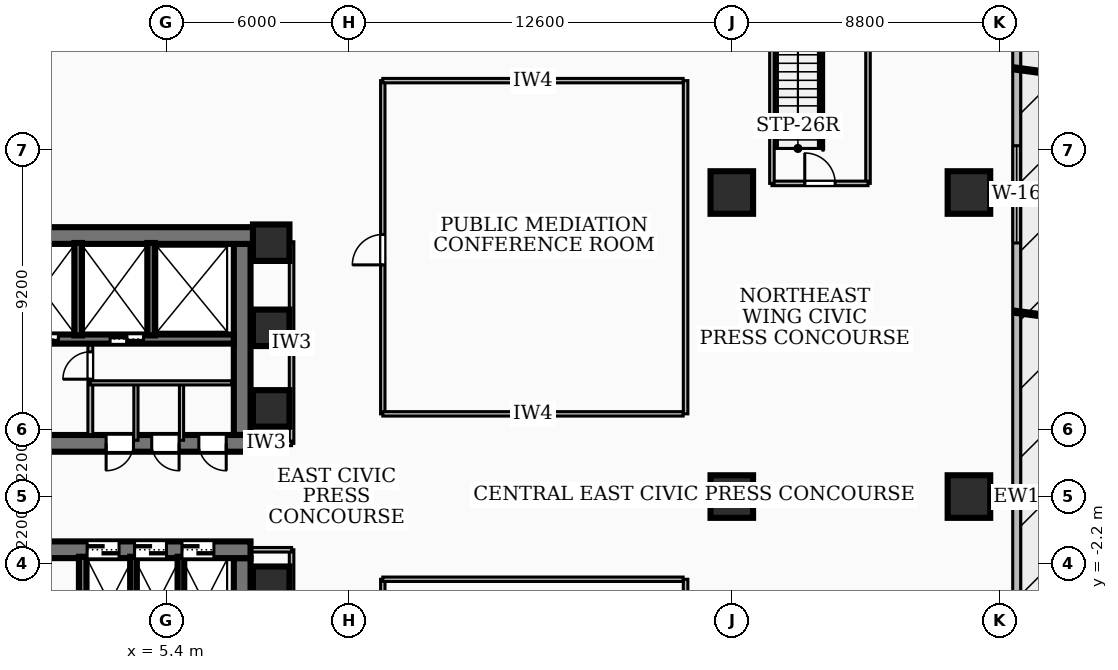
"""IFC4 building model, lengths in metres.
Left out: names, types, materials, properties, quantities, classifications, styles, units other than length and angle.
Written with IfcOpenShell. Run it as: python <this file> out.ifc"""

import sys

from ifc_helpers import new_model, si_unit, direction, frame, frame_2d, origin, origin_2d, place, context, subcontext, project, spatial, rectangle, extrude, element, fill, save


model = new_model("IFC4")
c1 = context("Model", 3, precision=1e-05, world=origin(), true_north=direction((0.0, 1.0)))
c2 = subcontext(c1, "Body", "Model", "MODEL_VIEW")
j1 = project(units=[si_unit("LENGTHUNIT", "METRE"), si_unit("PLANEANGLEUNIT", "RADIAN")], contexts=[c1])
p1 = place(None, origin())
s1 = spatial("IfcSite", under=j1, at=p1, CompositionType="ELEMENT")
p2 = place(p1, origin())
s2 = spatial("IfcBuilding", under=s1, at=p2, CompositionType="ELEMENT")
p3 = place(p2, frame((0.0, 0.0, 14.76)))
s3 = spatial("IfcBuildingStorey", under=s2, at=p3, CompositionType="ELEMENT", Elevation=14.76)
p4 = place(p3, frame((-8.78, 8.585, 0.0), z_axis=(0.0, 0.0, 1.0), x_axis=(1.0, 0.0, 0.0)))
e1 = element("IfcWall", 1, at=p4, inside=s3, PredefinedType="SHEAR", context=c2, shape_type="SweptSolid", body=[
    extrude(rectangle(XDim=17.56, YDim=0.55, at=frame_2d((8.78, 0.0))), origin(), (0.0, 0.0, 1.0), 4.28),
])
p5 = place(p3, frame((8.17, 1.75, 0.0), z_axis=(0.0, 0.0, 1.0), x_axis=(-1.0, 0.0, 0.0)))
e2 = element("IfcWall", 2, at=p5, inside=s3, PredefinedType="SHEAR", context=c2, shape_type="SweptSolid", body=[
    extrude(rectangle(XDim=16.34, YDim=0.55, at=frame_2d((8.17, 0.0))), origin(), (0.0, 0.0, 1.0), 4.28),
])
p6 = place(p5, frame((7.45, 0.0, 0.0)))
e3 = element("IfcOpeningElement", 3, at=p6, cuts=e2, PredefinedType="OPENING", context=c2, shape_type="SweptSolid", body=[
    extrude(rectangle(XDim=1.0, YDim=2.1, at=frame_2d((0.5, 1.05))), frame((0.0, 0.285, 0.0), z_axis=(0.0, -1.0, 0.0), x_axis=(1.0, 0.0, 0.0)), (0.0, 0.0, 1.0), 0.57),
])
p7 = place(p5, frame((3.85, 0.0, 0.0)))
e4 = element("IfcOpeningElement", 4, at=p7, cuts=e2, PredefinedType="OPENING", context=c2, shape_type="SweptSolid", body=[
    extrude(rectangle(XDim=0.9, YDim=2.06, at=frame_2d((0.45, 1.03))), frame((0.0, 0.285, 0.0), z_axis=(0.0, -1.0, 0.0), x_axis=(1.0, 0.0, 0.0)), (0.0, 0.0, 1.0), 0.57),
])
p8 = place(p5, frame((2.35, 0.0, 0.0)))
e5 = element("IfcOpeningElement", 5, at=p8, cuts=e2, PredefinedType="OPENING", context=c2, shape_type="SweptSolid", body=[
    extrude(rectangle(XDim=0.9, YDim=2.06, at=frame_2d((0.45, 1.03))), frame((0.0, 0.285, 0.0), z_axis=(0.0, -1.0, 0.0), x_axis=(1.0, 0.0, 0.0)), (0.0, 0.0, 1.0), 0.57),
])
p9 = place(p5, frame((0.8, 0.0, 0.0)))
e6 = element("IfcOpeningElement", 6, at=p9, cuts=e2, PredefinedType="OPENING", context=c2, shape_type="SweptSolid", body=[
    extrude(rectangle(XDim=0.9, YDim=2.06, at=frame_2d((0.45, 1.03))), frame((0.0, 0.285, 0.0), z_axis=(0.0, -1.0, 0.0), x_axis=(1.0, 0.0, 0.0)), (0.0, 0.0, 1.0), 0.57),
])
p10 = place(p3, frame((7.895, 8.31, 0.0), z_axis=(0.0, 0.0, 1.0), x_axis=(0.0, -1.0, 0.0)))
e7 = element("IfcWall", 7, at=p10, inside=s3, PredefinedType="SHEAR", context=c2, shape_type="SweptSolid", body=[
    extrude(rectangle(XDim=6.285, YDim=0.55, at=frame_2d((3.143, 0.0))), origin(), (0.0, 0.0, 1.0), 4.28),
])
p11 = place(p3, frame((7.62, 5.18, 0.0), z_axis=(0.0, 0.0, 1.0), x_axis=(-1.0, 0.0, 0.0)))
e8 = element("IfcWall", 8, at=p11, inside=s3, PredefinedType="SOLIDWALL", context=c2, shape_type="SweptSolid", body=[
    extrude(rectangle(XDim=15.24, YDim=0.3, at=frame_2d((7.62, 0.0))), origin(), (0.0, 0.0, 1.0), 4.28),
])
p12 = place(p11, frame((5.77, 0.0, 0.0)))
e9 = element("IfcOpeningElement", 9, at=p12, cuts=e8, PredefinedType="OPENING", context=c2, shape_type="SweptSolid", body=[
    extrude(rectangle(XDim=1.1, YDim=2.15, at=frame_2d((0.55, 1.075))), frame((0.0, 0.16, 0.0), z_axis=(0.0, -1.0, 0.0), x_axis=(1.0, 0.0, 0.0)), (0.0, 0.0, 1.0), 0.32),
])
p13 = place(p11, frame((2.97, 0.0, 0.0)))
e10 = element("IfcOpeningElement", 10, at=p13, cuts=e8, PredefinedType="OPENING", context=c2, shape_type="SweptSolid", body=[
    extrude(rectangle(XDim=1.1, YDim=2.15, at=frame_2d((0.55, 1.075))), frame((0.0, 0.16, 0.0), z_axis=(0.0, -1.0, 0.0), x_axis=(1.0, 0.0, 0.0)), (0.0, 0.0, 1.0), 0.32),
])
p14 = place(p11, frame((7.97, 0.0, 0.0)))
e11 = element("IfcOpeningElement", 11, at=p14, cuts=e8, PredefinedType="OPENING", context=c2, shape_type="SweptSolid", body=[
    extrude(rectangle(XDim=1.0, YDim=2.1, at=frame_2d((0.5, 1.05))), frame((0.0, 0.16, 0.0), z_axis=(0.0, -1.0, 0.0), x_axis=(1.0, 0.0, 0.0)), (0.0, 0.0, 1.0), 0.32),
])
p15 = place(p3, frame((-8.17, -1.75, 0.0), z_axis=(0.0, 0.0, 1.0), x_axis=(1.0, 0.0, 0.0)))
e12 = element("IfcWall", 12, at=p15, inside=s3, PredefinedType="SHEAR", context=c2, shape_type="SweptSolid", body=[
    extrude(rectangle(XDim=16.34, YDim=0.55, at=frame_2d((8.17, 0.0))), origin(), (0.0, 0.0, 1.0), 4.28),
])
p16 = place(p15, frame((7.45, 0.0, 0.0)))
e13 = element("IfcOpeningElement", 13, at=p16, cuts=e12, PredefinedType="OPENING", context=c2, shape_type="SweptSolid", body=[
    extrude(rectangle(XDim=1.0, YDim=2.1, at=frame_2d((0.5, 1.05))), frame((0.0, 0.285, 0.0), z_axis=(0.0, -1.0, 0.0), x_axis=(1.0, 0.0, 0.0)), (0.0, 0.0, 1.0), 0.57),
])
p17 = place(p15, frame((10.965, 0.0, 0.0)))
e14 = element("IfcOpeningElement", 14, at=p17, cuts=e12, PredefinedType="OPENING", context=c2, shape_type="SweptSolid", body=[
    extrude(rectangle(XDim=1.05, YDim=2.15, at=frame_2d((0.525, 1.075))), frame((0.0, 0.285, 0.0), z_axis=(0.0, -1.0, 0.0), x_axis=(1.0, 0.0, 0.0)), (0.0, 0.0, 1.0), 0.57),
])
p18 = place(p15, frame((12.525, 0.0, 0.0)))
e15 = element("IfcOpeningElement", 15, at=p18, cuts=e12, PredefinedType="OPENING", context=c2, shape_type="SweptSolid", body=[
    extrude(rectangle(XDim=1.05, YDim=2.15, at=frame_2d((0.525, 1.075))), frame((0.0, 0.285, 0.0), z_axis=(0.0, -1.0, 0.0), x_axis=(1.0, 0.0, 0.0)), (0.0, 0.0, 1.0), 0.57),
])
p19 = place(p15, frame((14.085, 0.0, 0.0)))
e16 = element("IfcOpeningElement", 16, at=p19, cuts=e12, PredefinedType="OPENING", context=c2, shape_type="SweptSolid", body=[
    extrude(rectangle(XDim=1.05, YDim=2.15, at=frame_2d((0.525, 1.075))), frame((0.0, 0.285, 0.0), z_axis=(0.0, -1.0, 0.0), x_axis=(1.0, 0.0, 0.0)), (0.0, 0.0, 1.0), 0.57),
])
p20 = place(p3, frame((7.895, -2.025, 0.0), z_axis=(0.0, 0.0, 1.0), x_axis=(0.0, -1.0, 0.0)))
e17 = element("IfcWall", 17, at=p20, inside=s3, PredefinedType="SHEAR", context=c2, shape_type="SweptSolid", body=[
    extrude(rectangle(XDim=6.285, YDim=0.55, at=frame_2d((3.143, 0.0))), origin(), (0.0, 0.0, 1.0), 4.28),
])
for number, where, z_axis, x_axis in (
    (18, (2.5, 5.3, 0.0), (0.0, 0.0, 1.0), (0.0, 1.0, 0.0)),
    (19, (4.9, 5.3, 0.0), (0.0, 0.0, 1.0), (0.0, 1.0, 0.0)),
):
    element("IfcWall", number, at=place(p3, frame(where, z_axis=z_axis, x_axis=x_axis)), inside=s3, PredefinedType="SOLIDWALL", context=c2, shape_type="SweptSolid", body=[
        extrude(rectangle(XDim=3.04, YDim=0.25, at=frame_2d((1.52, 0.0))), origin(), (0.0, 0.0, 1.0), 4.28),
    ])
p21 = place(p3, frame((2.65, -5.05, 0.0), z_axis=(0.0, 0.0, 1.0), x_axis=(0.0, 1.0, 0.0)))
e20 = element("IfcWall", 20, at=p21, inside=s3, PredefinedType="SOLIDWALL", context=c2, shape_type="SweptSolid", body=[
    extrude(rectangle(XDim=3.07, YDim=0.25, at=frame_2d((1.535, 0.0))), origin(), (0.0, 0.0, 1.0), 4.28),
])
for number, where, z_axis, x_axis in (
    (21, (4.32, -5.05, 0.0), (0.0, 0.0, 1.0), (0.0, 1.0, 0.0)),
    (22, (5.88, -5.05, 0.0), (0.0, 0.0, 1.0), (0.0, 1.0, 0.0)),
):
    element("IfcWall", number, at=place(p3, frame(where, z_axis=z_axis, x_axis=x_axis)), inside=s3, PredefinedType="SOLIDWALL", context=c2, shape_type="SweptSolid", body=[
        extrude(rectangle(XDim=3.07, YDim=0.22, at=frame_2d((1.535, 0.0))), origin(), (0.0, 0.0, 1.0), 4.28),
    ])
for number, where, z_axis, x_axis in (
    (23, (8.85, -2.9, 0.0), (0.0, 0.0, 1.0), (1.0, 0.0, 0.0)),
    (24, (8.85, 2.9, 0.0), (0.0, 0.0, 1.0), (1.0, 0.0, 0.0)),
    (25, (8.85, 5.55, 0.0), (0.0, 0.0, 1.0), (1.0, 0.0, 0.0)),
    (26, (8.85, 8.35, 0.0), (0.0, 0.0, 1.0), (1.0, 0.0, 0.0)),
):
    element("IfcColumn", number, at=place(p3, frame(where, z_axis=z_axis, x_axis=x_axis)), inside=s3, PredefinedType="COLUMN", context=c2, shape_type="SweptSolid", body=[
        extrude(rectangle(XDim=1.2, YDim=1.2, at=origin_2d()), origin(), (0.0, 0.0, 1.0), 4.68),
    ])
for number, where, z_axis, x_axis in (
    (27, (31.8, 0.0, 0.0), (0.0, 0.0, 1.0), (1.0, 0.0, 0.0)),
    (28, (31.8, 10.0, 0.0), (0.0, 0.0, 1.0), (1.0, 0.0, 0.0)),
    (29, (24.0, 0.0, 0.0), (0.0, 0.0, 1.0), (1.0, 0.0, 0.0)),
    (30, (24.0, 10.0, 0.0), (0.0, 0.0, 1.0), (1.0, 0.0, 0.0)),
):
    element("IfcColumn", number, at=place(p3, frame(where, z_axis=z_axis, x_axis=x_axis)), inside=s3, PredefinedType="COLUMN", context=c2, shape_type="SweptSolid", body=[
        extrude(rectangle(XDim=1.4, YDim=1.4, at=origin_2d()), origin(), (0.0, 0.0, 1.0), 4.68),
    ])
p22 = place(p3, frame((33.37, 27.14, 0.0), z_axis=(0.0, 0.0, 1.0), x_axis=(0.0, -1.0, 0.0)))
e31 = element("IfcWall", 31, at=p22, inside=s3, PredefinedType="SOLIDWALL", context=c2, shape_type="SweptSolid", body=[
    extrude(rectangle(XDim=54.28, YDim=0.26, at=frame_2d((27.14, 0.0))), origin(), (0.0, 0.0, 1.0), 4.28),
])
p23 = place(p22, frame((31.59, 0.0, 0.0)))
e32 = element("IfcOpeningElement", 32, at=p23, cuts=e31, PredefinedType="OPENING", context=c2, shape_type="SweptSolid", body=[
    extrude(rectangle(XDim=1.1, YDim=2.1, at=frame_2d((0.55, 1.05))), frame((0.0, 0.14, 0.0), z_axis=(0.0, -1.0, 0.0), x_axis=(1.0, 0.0, 0.0)), (0.0, 0.0, 1.0), 0.28),
])
p24 = place(p22, frame((6.0, 0.0, 0.9)))
e33 = element("IfcOpeningElement", 33, at=p24, cuts=e31, PredefinedType="OPENING", context=c2, shape_type="SweptSolid", body=[
    extrude(rectangle(XDim=3.2, YDim=2.6, at=frame_2d((1.6, 1.3))), frame((0.0, 0.14, 0.0), z_axis=(0.0, -1.0, 0.0), x_axis=(1.0, 0.0, 0.0)), (0.0, 0.0, 1.0), 0.28),
])
p25 = place(p22, frame((15.6, 0.0, 0.9)))
e34 = element("IfcOpeningElement", 34, at=p25, cuts=e31, PredefinedType="OPENING", context=c2, shape_type="SweptSolid", body=[
    extrude(rectangle(XDim=3.2, YDim=2.6, at=frame_2d((1.6, 1.3))), frame((0.0, 0.14, 0.0), z_axis=(0.0, -1.0, 0.0), x_axis=(1.0, 0.0, 0.0)), (0.0, 0.0, 1.0), 0.28),
])
p26 = place(p22, frame((35.48, 0.0, 0.9)))
e35 = element("IfcOpeningElement", 35, at=p26, cuts=e31, PredefinedType="OPENING", context=c2, shape_type="SweptSolid", body=[
    extrude(rectangle(XDim=3.2, YDim=2.6, at=frame_2d((1.6, 1.3))), frame((0.0, 0.14, 0.0), z_axis=(0.0, -1.0, 0.0), x_axis=(1.0, 0.0, 0.0)), (0.0, 0.0, 1.0), 0.28),
])
p27 = place(p22, frame((45.08, 0.0, 0.9)))
e36 = element("IfcOpeningElement", 36, at=p27, cuts=e31, PredefinedType="OPENING", context=c2, shape_type="SweptSolid", body=[
    extrude(rectangle(XDim=3.2, YDim=2.6, at=frame_2d((1.6, 1.3))), frame((0.0, 0.14, 0.0), z_axis=(0.0, -1.0, 0.0), x_axis=(1.0, 0.0, 0.0)), (0.0, 0.0, 1.0), 0.28),
])
for number, where, z_axis, x_axis in (
    (37, (25.32, 10.3, 0.0), (0.0, 0.0, 1.0), (0.0, 1.0, 0.0)),
    (38, (28.48, 10.3, 0.0), (0.0, 0.0, 1.0), (0.0, 1.0, 0.0)),
):
    element("IfcWall", number, at=place(p3, frame(where, z_axis=z_axis, x_axis=x_axis)), inside=s3, PredefinedType="PARTITIONING", context=c2, shape_type="SweptSolid", body=[
        extrude(rectangle(XDim=9.8, YDim=0.15, at=frame_2d((4.9, 0.0))), origin(), (0.0, 0.0, 1.0), 4.28),
    ])
p28 = place(p3, frame((25.32, 10.3, 0.0), z_axis=(0.0, 0.0, 1.0), x_axis=(1.0, 0.0, 0.0)))
e39 = element("IfcWall", 39, at=p28, inside=s3, PredefinedType="PARTITIONING", context=c2, shape_type="SweptSolid", body=[
    extrude(rectangle(XDim=3.16, YDim=0.15, at=frame_2d((1.58, 0.0))), origin(), (0.0, 0.0, 1.0), 3.29),
])
p29 = place(p28, frame((1.08, 0.0, 0.0)))
e40 = element("IfcOpeningElement", 40, at=p29, cuts=e39, PredefinedType="OPENING", context=c2, shape_type="SweptSolid", body=[
    extrude(rectangle(XDim=1.0, YDim=2.1, at=frame_2d((0.5, 1.05))), frame((0.0, 0.085, 0.0), z_axis=(0.0, -1.0, 0.0), x_axis=(1.0, 0.0, 0.0)), (0.0, 0.0, 1.0), 0.17),
])
p30 = place(p3, frame((2.9, 2.04, 0.0), z_axis=(0.0, 0.0, 1.0), x_axis=(0.0, 1.0, 0.0)))
e41 = element("IfcWall", 41, at=p30, inside=s3, PredefinedType="PARTITIONING", context=c2, shape_type="SweptSolid", body=[
    extrude(rectangle(XDim=2.94, YDim=0.16, at=frame_2d((1.47, 0.0))), origin(), (0.0, 0.0, 1.0), 3.345),
])
p31 = place(p30, frame((1.82, 0.0, 0.0)))
e42 = element("IfcOpeningElement", 42, at=p31, cuts=e41, PredefinedType="OPENING", context=c2, shape_type="SweptSolid", body=[
    extrude(rectangle(XDim=0.9, YDim=2.06, at=frame_2d((0.45, 1.03))), frame((0.0, 0.09, 0.0), z_axis=(0.0, -1.0, 0.0), x_axis=(1.0, 0.0, 0.0)), (0.0, 0.0, 1.0), 0.18),
])
p32 = place(p3, frame((2.9, 3.74, 0.0), z_axis=(0.0, 0.0, 1.0), x_axis=(1.0, 0.0, 0.0)))
e43 = element("IfcWall", 43, at=p32, inside=s3, PredefinedType="PARTITIONING", context=c2, shape_type="SweptSolid", body=[
    extrude(rectangle(XDim=4.65, YDim=0.138, at=frame_2d((2.325, 0.0))), origin(), (0.0, 0.0, 1.0), 4.28),
])
for number, where, z_axis, x_axis in (
    (44, (4.4, 1.85, 0.0), (0.0, 0.0, 1.0), (0.0, 1.0, 0.0)),
    (45, (5.9, 1.85, 0.0), (0.0, 0.0, 1.0), (0.0, 1.0, 0.0)),
):
    element("IfcWall", number, at=place(p3, frame(where, z_axis=z_axis, x_axis=x_axis)), inside=s3, PredefinedType="PARTITIONING", context=c2, shape_type="SweptSolid", body=[
        extrude(rectangle(XDim=1.89, YDim=0.138, at=frame_2d((0.945, 0.0))), origin(), (0.0, 0.0, 1.0), 3.345),
    ])
p33 = place(p3, frame((9.52, 1.75, 0.0), z_axis=(0.0, 0.0, 1.0), x_axis=(0.0, 1.0, 0.0)))
e46 = element("IfcWall", 46, at=p33, inside=s3, PredefinedType="PARTITIONING", context=c2, shape_type="SweptSolid", body=[
    extrude(rectangle(XDim=6.63, YDim=0.15, at=frame_2d((3.315, 0.0))), origin(), (0.0, 0.0, 1.0), 3.29),
])
p34 = place(p3, frame((7.85, 1.75, 0.0), z_axis=(0.0, 0.0, 1.0), x_axis=(1.0, 0.0, 0.0)))
e47 = element("IfcWall", 47, at=p34, inside=s3, PredefinedType="PARTITIONING", context=c2, shape_type="SweptSolid", body=[
    extrude(rectangle(XDim=1.67, YDim=0.15, at=frame_2d((0.835, 0.0))), origin(), (0.0, 0.0, 1.0), 3.345),
])
p35 = place(p3, frame((9.52, -8.38, 0.0), z_axis=(0.0, 0.0, 1.0), x_axis=(0.0, 1.0, 0.0)))
e48 = element("IfcWall", 48, at=p35, inside=s3, PredefinedType="PARTITIONING", context=c2, shape_type="SweptSolid", body=[
    extrude(rectangle(XDim=6.63, YDim=0.15, at=frame_2d((3.315, 0.0))), origin(), (0.0, 0.0, 1.0), 3.29),
])
p36 = place(p3, frame((7.85, -1.75, 0.0), z_axis=(0.0, 0.0, 1.0), x_axis=(1.0, 0.0, 0.0)))
e49 = element("IfcWall", 49, at=p36, inside=s3, PredefinedType="PARTITIONING", context=c2, shape_type="SweptSolid", body=[
    extrude(rectangle(XDim=1.67, YDim=0.15, at=frame_2d((0.835, 0.0))), origin(), (0.0, 0.0, 1.0), 3.345),
])
p37 = place(p3, frame((12.52, 2.72, 0.0), z_axis=(0.0, 0.0, 1.0), x_axis=(0.0, 1.0, 0.0)))
e50 = element("IfcWall", 50, at=p37, inside=s3, PredefinedType="PARTITIONING", context=c2, shape_type="SweptSolid", body=[
    extrude(rectangle(XDim=10.96, YDim=0.145, at=frame_2d((5.48, 0.0))), origin(), (0.0, 0.0, 1.0), 3.29),
])
p38 = place(p37, frame((4.9, 0.0, 0.0)))
e51 = element("IfcOpeningElement", 51, at=p38, cuts=e50, PredefinedType="OPENING", context=c2, shape_type="SweptSolid", body=[
    extrude(rectangle(XDim=1.0, YDim=2.1, at=frame_2d((0.5, 1.05))), frame((0.0, 0.083, 0.0), z_axis=(0.0, -1.0, 0.0), x_axis=(1.0, 0.0, 0.0)), (0.0, 0.0, 1.0), 0.165),
])
for number, where, z_axis, x_axis in (
    (52, (12.52, 2.72, 0.0), (0.0, 0.0, 1.0), (1.0, 0.0, 0.0)),
    (53, (12.52, 13.68, 0.0), (0.0, 0.0, 1.0), (1.0, 0.0, 0.0)),
):
    element("IfcWall", number, at=place(p3, frame(where, z_axis=z_axis, x_axis=x_axis)), inside=s3, PredefinedType="PARTITIONING", context=c2, shape_type="SweptSolid", body=[
        extrude(rectangle(XDim=9.88, YDim=0.145, at=frame_2d((4.94, 0.0))), origin(), (0.0, 0.0, 1.0), 4.28),
    ])
p39 = place(p3, frame((22.48, 2.72, 0.0), z_axis=(0.0, 0.0, 1.0), x_axis=(0.0, 1.0, 0.0)))
e54 = element("IfcWall", 54, at=p39, inside=s3, PredefinedType="PARTITIONING", context=c2, shape_type="SweptSolid", body=[
    extrude(rectangle(XDim=10.96, YDim=0.15, at=frame_2d((5.48, 0.0))), origin(), (0.0, 0.0, 1.0), 3.29),
])
p40 = place(p3, frame((12.52, -13.68, 0.0), z_axis=(0.0, 0.0, 1.0), x_axis=(0.0, 1.0, 0.0)))
e55 = element("IfcWall", 55, at=p40, inside=s3, PredefinedType="PARTITIONING", context=c2, shape_type="SweptSolid", body=[
    extrude(rectangle(XDim=10.96, YDim=0.145, at=frame_2d((5.48, 0.0))), origin(), (0.0, 0.0, 1.0), 3.29),
])
p41 = place(p40, frame((4.9, 0.0, 0.0)))
e56 = element("IfcOpeningElement", 56, at=p41, cuts=e55, PredefinedType="OPENING", context=c2, shape_type="SweptSolid", body=[
    extrude(rectangle(XDim=1.0, YDim=2.1, at=frame_2d((0.5, 1.05))), frame((0.0, 0.083, 0.0), z_axis=(0.0, -1.0, 0.0), x_axis=(1.0, 0.0, 0.0)), (0.0, 0.0, 1.0), 0.165),
])
p42 = place(p3, frame((12.52, -2.72, 0.0), z_axis=(0.0, 0.0, 1.0), x_axis=(1.0, 0.0, 0.0)))
e57 = element("IfcWall", 57, at=p42, inside=s3, PredefinedType="PARTITIONING", context=c2, shape_type="SweptSolid", body=[
    extrude(rectangle(XDim=9.88, YDim=0.145, at=frame_2d((4.94, 0.0))), origin(), (0.0, 0.0, 1.0), 4.28),
])
p43 = place(p3, frame((22.48, -13.68, 0.0), z_axis=(0.0, 0.0, 1.0), x_axis=(0.0, 1.0, 0.0)))
e58 = element("IfcWall", 58, at=p43, inside=s3, PredefinedType="PARTITIONING", context=c2, shape_type="SweptSolid", body=[
    extrude(rectangle(XDim=10.96, YDim=0.15, at=frame_2d((5.48, 0.0))), origin(), (0.0, 0.0, 1.0), 3.29),
])
p44 = place(p25, origin())
e59 = element("IfcWindow", 59, at=p44, inside=s3, PartitioningType="SINGLE_PANEL", PredefinedType="WINDOW", context=c2, shape_type="SweptSolid", body=[
    extrude(rectangle(XDim=3.2, YDim=2.6, at=frame_2d((1.6, 1.3))), frame((0.0, 0.03, 0.0), z_axis=(0.0, -1.0, 0.0), x_axis=(1.0, 0.0, 0.0)), (0.0, 0.0, 1.0), 0.06),
])
fill(e34, e59)
p45 = place(p29, origin())
e60 = element("IfcDoor", 60, at=p45, inside=s3, OperationType="SINGLE_SWING_LEFT", PredefinedType="DOOR", context=c2, shape_type="SweptSolid", body=[
    extrude(rectangle(XDim=1.0, YDim=2.1, at=frame_2d((0.5, 1.05))), frame((0.0, 0.025, 0.0), z_axis=(0.0, -1.0, 0.0), x_axis=(1.0, 0.0, 0.0)), (0.0, 0.0, 1.0), 0.05),
])
fill(e40, e60)
p46 = place(p12, origin())
e61 = element("IfcDoor", 61, at=p46, inside=s3, OperationType="DOUBLE_DOOR_SLIDING", PredefinedType="DOOR", context=c2, shape_type="SweptSolid", body=[
    extrude(rectangle(XDim=1.1, YDim=2.15, at=frame_2d((0.55, 1.075))), frame((0.0, 0.025, 0.0), z_axis=(0.0, -1.0, 0.0), x_axis=(1.0, 0.0, 0.0)), (0.0, 0.0, 1.0), 0.05),
])
fill(e9, e61)
p47 = place(p13, origin())
e62 = element("IfcDoor", 62, at=p47, inside=s3, OperationType="DOUBLE_DOOR_SLIDING", PredefinedType="DOOR", context=c2, shape_type="SweptSolid", body=[
    extrude(rectangle(XDim=1.1, YDim=2.15, at=frame_2d((0.55, 1.075))), frame((0.0, 0.025, 0.0), z_axis=(0.0, -1.0, 0.0), x_axis=(1.0, 0.0, 0.0)), (0.0, 0.0, 1.0), 0.05),
])
fill(e10, e62)
p48 = place(p17, origin())
e63 = element("IfcDoor", 63, at=p48, inside=s3, OperationType="DOUBLE_DOOR_SLIDING", PredefinedType="DOOR", context=c2, shape_type="SweptSolid", body=[
    extrude(rectangle(XDim=1.05, YDim=2.15, at=frame_2d((0.525, 1.075))), frame((0.0, 0.025, 0.0), z_axis=(0.0, -1.0, 0.0), x_axis=(1.0, 0.0, 0.0)), (0.0, 0.0, 1.0), 0.05),
])
fill(e14, e63)
p49 = place(p18, origin())
e64 = element("IfcDoor", 64, at=p49, inside=s3, OperationType="DOUBLE_DOOR_SLIDING", PredefinedType="DOOR", context=c2, shape_type="SweptSolid", body=[
    extrude(rectangle(XDim=1.05, YDim=2.15, at=frame_2d((0.525, 1.075))), frame((0.0, 0.025, 0.0), z_axis=(0.0, -1.0, 0.0), x_axis=(1.0, 0.0, 0.0)), (0.0, 0.0, 1.0), 0.05),
])
fill(e15, e64)
p50 = place(p19, origin())
e65 = element("IfcDoor", 65, at=p50, inside=s3, OperationType="DOUBLE_DOOR_SLIDING", PredefinedType="DOOR", context=c2, shape_type="SweptSolid", body=[
    extrude(rectangle(XDim=1.05, YDim=2.15, at=frame_2d((0.525, 1.075))), frame((0.0, 0.025, 0.0), z_axis=(0.0, -1.0, 0.0), x_axis=(1.0, 0.0, 0.0)), (0.0, 0.0, 1.0), 0.05),
])
fill(e16, e65)
p51 = place(p7, origin())
e66 = element("IfcDoor", 66, at=p51, inside=s3, OperationType="SINGLE_SWING_RIGHT", PredefinedType="DOOR", context=c2, shape_type="SweptSolid", body=[
    extrude(rectangle(XDim=0.9, YDim=2.06, at=frame_2d((0.45, 1.03))), frame((0.0, 0.025, 0.0), z_axis=(0.0, -1.0, 0.0), x_axis=(1.0, 0.0, 0.0)), (0.0, 0.0, 1.0), 0.05),
])
fill(e4, e66)
p52 = place(p8, origin())
e67 = element("IfcDoor", 67, at=p52, inside=s3, OperationType="SINGLE_SWING_LEFT", PredefinedType="DOOR", context=c2, shape_type="SweptSolid", body=[
    extrude(rectangle(XDim=0.9, YDim=2.06, at=frame_2d((0.45, 1.03))), frame((0.0, 0.025, 0.0), z_axis=(0.0, -1.0, 0.0), x_axis=(1.0, 0.0, 0.0)), (0.0, 0.0, 1.0), 0.05),
])
fill(e5, e67)
p53 = place(p9, origin())
e68 = element("IfcDoor", 68, at=p53, inside=s3, OperationType="SINGLE_SWING_LEFT", PredefinedType="DOOR", context=c2, shape_type="SweptSolid", body=[
    extrude(rectangle(XDim=0.9, YDim=2.06, at=frame_2d((0.45, 1.03))), frame((0.0, 0.025, 0.0), z_axis=(0.0, -1.0, 0.0), x_axis=(1.0, 0.0, 0.0)), (0.0, 0.0, 1.0), 0.05),
])
fill(e6, e68)
p54 = place(p31, origin())
e69 = element("IfcDoor", 69, at=p54, inside=s3, OperationType="SINGLE_SWING_LEFT", PredefinedType="DOOR", context=c2, shape_type="SweptSolid", body=[
    extrude(rectangle(XDim=0.9, YDim=2.06, at=frame_2d((0.45, 1.03))), frame((0.0, 0.025, 0.0), z_axis=(0.0, -1.0, 0.0), x_axis=(1.0, 0.0, 0.0)), (0.0, 0.0, 1.0), 0.05),
])
fill(e42, e69)
p55 = place(p38, origin())
e70 = element("IfcDoor", 70, at=p55, inside=s3, OperationType="SINGLE_SWING_LEFT", PredefinedType="DOOR", context=c2, shape_type="SweptSolid", body=[
    extrude(rectangle(XDim=1.0, YDim=2.1, at=frame_2d((0.5, 1.05))), frame((0.0, 0.025, 0.0), z_axis=(0.0, -1.0, 0.0), x_axis=(1.0, 0.0, 0.0)), (0.0, 0.0, 1.0), 0.05),
])
fill(e51, e70)
save(model, sys.argv[1])
